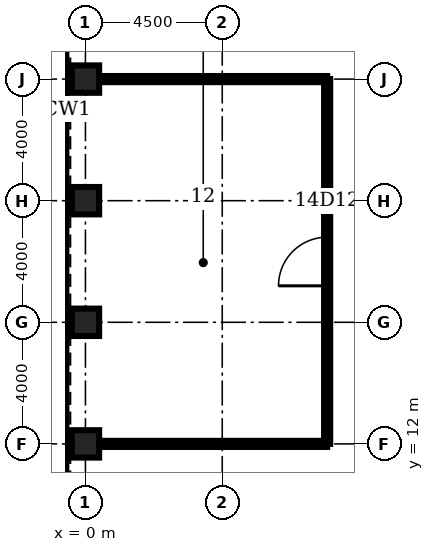
"""IFC4 building model, lengths in metres.
Left out: names, types, materials, properties, quantities, classifications, styles, units other than length and angle.
Written with IfcOpenShell. Run it as: python <this file> out.ifc"""

import sys

from ifc_helpers import new_model, si_unit, direction, frame, frame_2d, origin, origin_2d, place, context, subcontext, project, spatial, rectangle, hollow_rectangle, extrude, element, fill, save


model = new_model("IFC4")
c1 = context("Model", 3, precision=1e-05, world=origin(), true_north=direction((0.0, 1.0)))
c2 = subcontext(c1, "Body", "Model", "MODEL_VIEW")
j1 = project(units=[si_unit("LENGTHUNIT", "METRE"), si_unit("PLANEANGLEUNIT", "RADIAN")], contexts=[c1])
p1 = place(None, origin())
s1 = spatial("IfcSite", under=j1, at=p1, CompositionType="ELEMENT")
p2 = place(p1, origin())
s2 = spatial("IfcBuilding", under=s1, at=p2, CompositionType="ELEMENT")
p3 = place(p2, frame((0.0, 0.0, 68.0)))
s3 = spatial("IfcBuildingStorey", under=s2, at=p3, CompositionType="ELEMENT", Elevation=68.0)
for number, where, z_axis, x_axis in (
    (1, (0.0, 24.0, 0.0), (0.0, 0.0, 1.0), (1.0, 0.0, 0.0)),
    (2, (0.0, 20.0, 0.0), (0.0, 0.0, 1.0), (1.0, 0.0, 0.0)),
    (3, (0.0, 16.0, 0.0), (0.0, 0.0, 1.0), (1.0, 0.0, 0.0)),
    (4, (0.0, 12.0, 0.0), (0.0, 0.0, 1.0), (1.0, 0.0, 0.0)),
):
    element("IfcColumn", number, at=place(p3, frame(where, z_axis=z_axis, x_axis=x_axis)), inside=s3, PredefinedType="COLUMN", context=c2, shape_type="SweptSolid", body=[
        extrude(hollow_rectangle(XDim=0.9, YDim=0.9, WallThickness=0.12, at=origin_2d()), origin(), (0.0, 0.0, 1.0), 4.5),
    ])
for number, where, z_axis, x_axis in (
    (5, (0.45, 12.0, 0.0), (0.0, 0.0, 1.0), (1.0, 0.0, 0.0)),
    (6, (0.45, 24.0, 0.0), (0.0, 0.0, 1.0), (1.0, 0.0, 0.0)),
):
    element("IfcWall", number, at=place(p3, frame(where, z_axis=z_axis, x_axis=x_axis)), inside=s3, PredefinedType="PARTITIONING", context=c2, shape_type="SweptSolid", body=[
        extrude(rectangle(XDim=7.5, YDim=0.2, at=frame_2d((3.75, 0.0))), origin(), (0.0, 0.0, 1.0), 3.0),
    ])
p4 = place(p3, frame((7.95, 12.0, 0.0), z_axis=(0.0, 0.0, 1.0), x_axis=(0.0, 1.0, 0.0)))
e7 = element("IfcWall", 7, at=p4, inside=s3, PredefinedType="PARTITIONING", context=c2, shape_type="SweptSolid", body=[
    extrude(rectangle(XDim=12.0, YDim=0.2, at=frame_2d((6.0, 0.0))), origin(), (0.0, 0.0, 1.0), 3.0),
])
p5 = place(p4, frame((5.2, 0.0, 0.0)))
e8 = element("IfcOpeningElement", 8, at=p5, cuts=e7, PredefinedType="OPENING", context=c2, shape_type="SweptSolid", body=[
    extrude(rectangle(XDim=1.6, YDim=2.1, at=frame_2d((0.8, 1.05))), frame((0.0, 0.11, 0.0), z_axis=(0.0, -1.0, 0.0), x_axis=(1.0, 0.0, 0.0)), (0.0, 0.0, 1.0), 0.22),
])
p6 = place(p5, origin())
e9 = element("IfcDoor", 9, at=p6, inside=s3, OperationType="SINGLE_SWING_LEFT", PredefinedType="DOOR", context=c2, shape_type="SweptSolid", body=[
    extrude(rectangle(XDim=1.6, YDim=2.1, at=frame_2d((0.8, 1.05))), frame((0.0, 0.025, 0.0), z_axis=(0.0, -1.0, 0.0), x_axis=(1.0, 0.0, 0.0)), (0.0, 0.0, 1.0), 0.05),
])
fill(e8, e9)
save(model, sys.argv[1])
